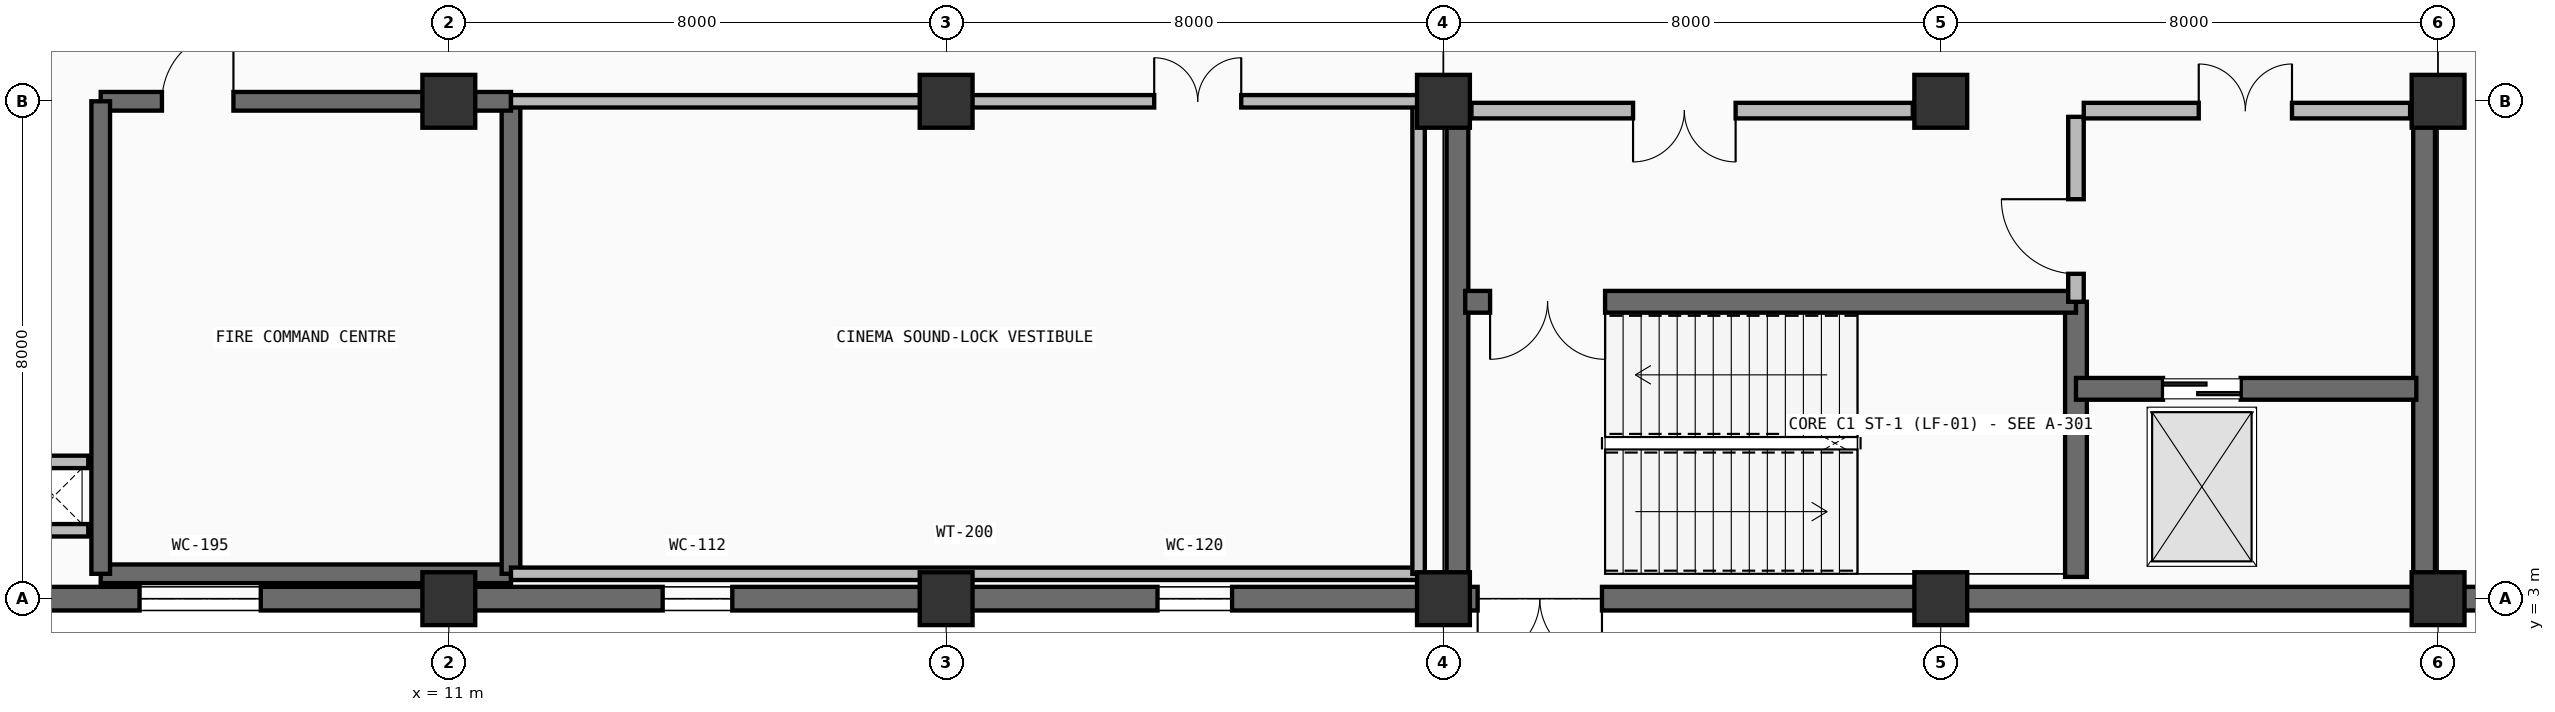
"""IFC4 building model, lengths in metres.
Left out: names, types, materials, properties, quantities, classifications, styles, units other than length and angle.
Written with IfcOpenShell. Run it as: python <this file> out.ifc"""

import sys

from ifc_helpers import new_model, si_unit, direction, frame, frame_2d, origin, origin_2d, place, context, subcontext, project, spatial, rectangle, extrude, element, fill, save


model = new_model("IFC4")
c1 = context("Model", 3, precision=1e-05, world=origin(), true_north=direction((0.0, 1.0)))
c2 = subcontext(c1, "Body", "Model", "MODEL_VIEW")
j1 = project(units=[si_unit("LENGTHUNIT", "METRE"), si_unit("PLANEANGLEUNIT", "RADIAN")], contexts=[c1])
p1 = place(None, origin())
s1 = spatial("IfcSite", under=j1, at=p1, CompositionType="ELEMENT")
p2 = place(p1, origin())
s2 = spatial("IfcBuilding", under=s1, at=p2, CompositionType="ELEMENT")
p3 = place(p2, origin())
s3 = spatial("IfcBuildingStorey", under=s2, at=p3, CompositionType="ELEMENT", Elevation=0.0)
for number, where, z_axis, x_axis in (
    (1, (11.0, 3.0, 0.0), (0.0, 0.0, 1.0), (1.0, 0.0, 0.0)),
    (2, (11.0, 11.0, 0.0), (0.0, 0.0, 1.0), (1.0, 0.0, 0.0)),
    (3, (19.0, 3.0, 0.0), (0.0, 0.0, 1.0), (1.0, 0.0, 0.0)),
    (4, (19.0, 11.0, 0.0), (0.0, 0.0, 1.0), (1.0, 0.0, 0.0)),
    (5, (27.0, 3.0, 0.0), (0.0, 0.0, 1.0), (1.0, 0.0, 0.0)),
    (6, (27.0, 11.0, 0.0), (0.0, 0.0, 1.0), (1.0, 0.0, 0.0)),
    (7, (35.0, 3.0, 0.0), (0.0, 0.0, 1.0), (1.0, 0.0, 0.0)),
    (8, (35.0, 11.0, 0.0), (0.0, 0.0, 1.0), (1.0, 0.0, 0.0)),
    (9, (43.0, 3.0, 0.0), (0.0, 0.0, 1.0), (1.0, 0.0, 0.0)),
    (10, (43.0, 11.0, 0.0), (0.0, 0.0, 1.0), (1.0, 0.0, 0.0)),
):
    element("IfcColumn", number, at=place(p3, frame(where, z_axis=z_axis, x_axis=x_axis)), inside=s3, PredefinedType="COLUMN", context=c2, shape_type="SweptSolid", body=[
        extrude(rectangle(XDim=0.85, YDim=0.85, at=origin_2d()), origin(), (0.0, 0.0, 1.0), 5.4),
    ])
p4 = place(p3, frame((51.0, 3.0, 0.0), z_axis=(0.0, 0.0, 1.0), x_axis=(-1.0, 0.0, 0.0)))
e11 = element("IfcWall", 11, at=p4, inside=s3, PredefinedType="SOLIDWALL", context=c2, shape_type="SweptSolid", body=[
    extrude(rectangle(XDim=8.0, YDim=0.38, at=frame_2d((4.0, 0.0))), origin(), (0.0, 0.0, 1.0), 5.4),
])
p5 = place(p4, frame((1.15, 0.0, 0.0)))
e12 = element("IfcOpeningElement", 12, at=p5, cuts=e11, PredefinedType="OPENING", context=c2, shape_type="SweptSolid", body=[
    extrude(rectangle(XDim=2.2, YDim=2.8, at=frame_2d((1.1, 1.4))), frame((0.0, 0.2, 0.0), z_axis=(0.0, -1.0, 0.0), x_axis=(1.0, 0.0, 0.0)), (0.0, 0.0, 1.0), 0.4),
])
p6 = place(p4, frame((4.65, 0.0, 0.0)))
e13 = element("IfcOpeningElement", 13, at=p6, cuts=e11, PredefinedType="OPENING", context=c2, shape_type="SweptSolid", body=[
    extrude(rectangle(XDim=2.2, YDim=2.8, at=frame_2d((1.1, 1.4))), frame((0.0, 0.2, 0.0), z_axis=(0.0, -1.0, 0.0), x_axis=(1.0, 0.0, 0.0)), (0.0, 0.0, 1.0), 0.4),
])
p7 = place(p3, frame((43.0, 3.0, 0.0), z_axis=(0.0, 0.0, 1.0), x_axis=(-1.0, 0.0, 0.0)))
e14 = element("IfcWall", 14, at=p7, inside=s3, PredefinedType="SOLIDWALL", context=c2, shape_type="SweptSolid", body=[
    extrude(rectangle(XDim=8.0, YDim=0.38, at=frame_2d((4.0, 0.0))), origin(), (0.0, 0.0, 1.0), 5.4),
])
p8 = place(p3, frame((35.0, 3.0, 0.0), z_axis=(0.0, 0.0, 1.0), x_axis=(-1.0, 0.0, 0.0)))
e15 = element("IfcWall", 15, at=p8, inside=s3, PredefinedType="SOLIDWALL", context=c2, shape_type="SweptSolid", body=[
    extrude(rectangle(XDim=8.0, YDim=0.38, at=frame_2d((4.0, 0.0))), origin(), (0.0, 0.0, 1.0), 5.4),
])
p9 = place(p8, frame((5.45, 0.0, 0.0)))
e16 = element("IfcOpeningElement", 16, at=p9, cuts=e15, PredefinedType="OPENING", context=c2, shape_type="SweptSolid", body=[
    extrude(rectangle(XDim=2.0, YDim=2.6, at=frame_2d((1.0, 1.3))), frame((0.0, 0.2, 0.0), z_axis=(0.0, -1.0, 0.0), x_axis=(1.0, 0.0, 0.0)), (0.0, 0.0, 1.0), 0.4),
])
p10 = place(p3, frame((27.0, 3.0, 0.0), z_axis=(0.0, 0.0, 1.0), x_axis=(-1.0, 0.0, 0.0)))
e17 = element("IfcWall", 17, at=p10, inside=s3, PredefinedType="SOLIDWALL", context=c2, shape_type="SweptSolid", body=[
    extrude(rectangle(XDim=8.0, YDim=0.38, at=frame_2d((4.0, 0.0))), origin(), (0.0, 0.0, 1.0), 5.4),
])
p11 = place(p10, frame((3.4, 0.0, 0.85)))
e18 = element("IfcOpeningElement", 18, at=p11, cuts=e17, PredefinedType="OPENING", context=c2, shape_type="SweptSolid", body=[
    extrude(rectangle(XDim=1.2, YDim=2.2, at=frame_2d((0.6, 1.1))), frame((0.0, 0.2, 0.0), z_axis=(0.0, -1.0, 0.0), x_axis=(1.0, 0.0, 0.0)), (0.0, 0.0, 1.0), 0.4),
])
p12 = place(p3, frame((19.0, 3.0, 0.0), z_axis=(0.0, 0.0, 1.0), x_axis=(-1.0, 0.0, 0.0)))
e19 = element("IfcWall", 19, at=p12, inside=s3, PredefinedType="SOLIDWALL", context=c2, shape_type="SweptSolid", body=[
    extrude(rectangle(XDim=8.0, YDim=0.38, at=frame_2d((4.0, 0.0))), origin(), (0.0, 0.0, 1.0), 5.4),
])
p13 = place(p12, frame((3.44, 0.0, 0.85)))
e20 = element("IfcOpeningElement", 20, at=p13, cuts=e19, PredefinedType="OPENING", context=c2, shape_type="SweptSolid", body=[
    extrude(rectangle(XDim=1.12, YDim=2.05, at=frame_2d((0.56, 1.025))), frame((0.0, 0.2, 0.0), z_axis=(0.0, -1.0, 0.0), x_axis=(1.0, 0.0, 0.0)), (0.0, 0.0, 1.0), 0.4),
])
p14 = place(p3, frame((11.0, 3.0, 0.0), z_axis=(0.0, 0.0, 1.0), x_axis=(-1.0, 0.0, 0.0)))
e21 = element("IfcWall", 21, at=p14, inside=s3, PredefinedType="SOLIDWALL", context=c2, shape_type="SweptSolid", body=[
    extrude(rectangle(XDim=8.0, YDim=0.38, at=frame_2d((4.0, 0.0))), origin(), (0.0, 0.0, 1.0), 5.4),
])
p15 = place(p14, frame((3.025, 0.0, 0.85)))
e22 = element("IfcOpeningElement", 22, at=p15, cuts=e21, PredefinedType="OPENING", context=c2, shape_type="SweptSolid", body=[
    extrude(rectangle(XDim=1.95, YDim=3.3, at=frame_2d((0.975, 1.65))), frame((0.0, 0.2, 0.0), z_axis=(0.0, -1.0, 0.0), x_axis=(1.0, 0.0, 0.0)), (0.0, 0.0, 1.0), 0.4),
])
p16 = place(p3, frame((27.225, 3.2, 0.0), z_axis=(0.0, 0.0, 1.0), x_axis=(0.0, 1.0, 0.0)))
e23 = element("IfcWall", 23, at=p16, inside=s3, PredefinedType="SHEAR", context=c2, shape_type="SweptSolid", body=[
    extrude(rectangle(XDim=7.6, YDim=0.35, at=frame_2d((3.8, 0.0))), origin(), (0.0, 0.0, 1.0), 5.1),
])
p17 = place(p3, frame((37.175, 3.35, 0.0), z_axis=(0.0, 0.0, 1.0), x_axis=(0.0, 1.0, 0.0)))
e24 = element("IfcWall", 24, at=p17, inside=s3, PredefinedType="SHEAR", context=c2, shape_type="SweptSolid", body=[
    extrude(rectangle(XDim=4.425, YDim=0.35, at=frame_2d((2.212, 0.0))), origin(), (0.0, 0.0, 1.0), 5.1),
])
p18 = place(p3, frame((42.775, 3.2, 0.0), z_axis=(0.0, 0.0, 1.0), x_axis=(0.0, 1.0, 0.0)))
e25 = element("IfcWall", 25, at=p18, inside=s3, PredefinedType="SHEAR", context=c2, shape_type="SweptSolid", body=[
    extrude(rectangle(XDim=7.6, YDim=0.35, at=frame_2d((3.8, 0.0))), origin(), (0.0, 0.0, 1.0), 5.1),
])
p19 = place(p3, frame((27.35, 7.775, 0.0), z_axis=(0.0, 0.0, 1.0), x_axis=(1.0, 0.0, 0.0)))
e26 = element("IfcWall", 26, at=p19, inside=s3, PredefinedType="SHEAR", context=c2, shape_type="SweptSolid", body=[
    extrude(rectangle(XDim=9.825, YDim=0.35, at=frame_2d((4.913, 0.0))), origin(), (0.0, 0.0, 1.0), 5.1),
])
p20 = place(p19, frame((0.4, 0.0, 0.0)))
e27 = element("IfcOpeningElement", 27, at=p20, cuts=e26, PredefinedType="OPENING", context=c2, shape_type="SweptSolid", body=[
    extrude(rectangle(XDim=1.85, YDim=2.25, at=frame_2d((0.925, 1.125))), frame((0.0, 0.185, 0.0), z_axis=(0.0, -1.0, 0.0), x_axis=(1.0, 0.0, 0.0)), (0.0, 0.0, 1.0), 0.37),
])
p21 = place(p3, frame((37.175, 6.375, 0.0), z_axis=(0.0, 0.0, 1.0), x_axis=(1.0, 0.0, 0.0)))
e28 = element("IfcWall", 28, at=p21, inside=s3, PredefinedType="SHEAR", context=c2, shape_type="SweptSolid", body=[
    extrude(rectangle(XDim=5.475, YDim=0.35, at=frame_2d((2.737, 0.0))), origin(), (0.0, 0.0, 1.0), 5.1),
])
p22 = place(p21, frame((1.4, 0.0, 0.0)))
e29 = element("IfcOpeningElement", 29, at=p22, cuts=e28, PredefinedType="OPENING", context=c2, shape_type="SweptSolid", body=[
    extrude(rectangle(XDim=1.25, YDim=2.25, at=frame_2d((0.625, 1.125))), frame((0.0, 0.185, 0.0), z_axis=(0.0, -1.0, 0.0), x_axis=(1.0, 0.0, 0.0)), (0.0, 0.0, 1.0), 0.37),
])
p23 = place(p3, frame((37.175, 7.775, 0.0), z_axis=(0.0, 0.0, 1.0), x_axis=(0.0, 1.0, 0.0)))
e30 = element("IfcWall", 30, at=p23, inside=s3, PredefinedType="PARTITIONING", context=c2, shape_type="SweptSolid", body=[
    extrude(rectangle(XDim=2.975, YDim=0.25, at=frame_2d((1.488, 0.0))), origin(), (0.0, 0.0, 1.0), 5.1),
])
p24 = place(p23, frame((0.45, 0.0, 0.0)))
e31 = element("IfcOpeningElement", 31, at=p24, cuts=e30, PredefinedType="OPENING", context=c2, shape_type="SweptSolid", body=[
    extrude(rectangle(XDim=1.2, YDim=2.2, at=frame_2d((0.6, 1.1))), frame((0.0, 0.135, 0.0), z_axis=(0.0, -1.0, 0.0), x_axis=(1.0, 0.0, 0.0)), (0.0, 0.0, 1.0), 0.27),
])
p25 = place(p3, frame((27.45, 10.85, 0.0), z_axis=(0.0, 0.0, 1.0), x_axis=(1.0, 0.0, 0.0)))
e32 = element("IfcWall", 32, at=p25, inside=s3, PredefinedType="PARTITIONING", context=c2, shape_type="SweptSolid", body=[
    extrude(rectangle(XDim=7.1, YDim=0.25, at=frame_2d((3.55, 0.0))), origin(), (0.0, 0.0, 1.0), 4.335),
])
p26 = place(p25, frame((2.6, 0.0, 0.0)))
e33 = element("IfcOpeningElement", 33, at=p26, cuts=e32, PredefinedType="OPENING", context=c2, shape_type="SweptSolid", body=[
    extrude(rectangle(XDim=1.65, YDim=2.25, at=frame_2d((0.825, 1.125))), frame((0.0, 0.135, 0.0), z_axis=(0.0, -1.0, 0.0), x_axis=(1.0, 0.0, 0.0)), (0.0, 0.0, 1.0), 0.27),
])
p27 = place(p3, frame((37.3, 10.85, 0.0), z_axis=(0.0, 0.0, 1.0), x_axis=(1.0, 0.0, 0.0)))
e34 = element("IfcWall", 34, at=p27, inside=s3, PredefinedType="PARTITIONING", context=c2, shape_type="SweptSolid", body=[
    extrude(rectangle(XDim=5.25, YDim=0.25, at=frame_2d((2.625, 0.0))), origin(), (0.0, 0.0, 1.0), 4.335),
])
p28 = place(p27, frame((1.85, 0.0, 0.0)))
e35 = element("IfcOpeningElement", 35, at=p28, cuts=e34, PredefinedType="OPENING", context=c2, shape_type="SweptSolid", body=[
    extrude(rectangle(XDim=1.5, YDim=2.2, at=frame_2d((0.75, 1.1))), frame((0.0, 0.135, 0.0), z_axis=(0.0, -1.0, 0.0), x_axis=(1.0, 0.0, 0.0)), (0.0, 0.0, 1.0), 0.27),
])
p29 = place(p3, frame((5.4, 3.4, 0.0), z_axis=(0.0, 0.0, 1.0), x_axis=(1.0, 0.0, 0.0)))
e36 = element("IfcWall", 36, at=p29, inside=s3, PredefinedType="SHEAR", context=c2, shape_type="SweptSolid", body=[
    extrude(rectangle(XDim=6.6, YDim=0.3, at=frame_2d((3.3, 0.0))), origin(), (0.0, 0.0, 1.0), 5.1),
])
p30 = place(p3, frame((12.0, 3.4, 0.0), z_axis=(0.0, 0.0, 1.0), x_axis=(0.0, 1.0, 0.0)))
e37 = element("IfcWall", 37, at=p30, inside=s3, PredefinedType="SHEAR", context=c2, shape_type="SweptSolid", body=[
    extrude(rectangle(XDim=7.6, YDim=0.3, at=frame_2d((3.8, 0.0))), origin(), (0.0, 0.0, 1.0), 5.1),
])
p31 = place(p3, frame((5.4, 11.0, 0.0), z_axis=(0.0, 0.0, 1.0), x_axis=(1.0, 0.0, 0.0)))
e38 = element("IfcWall", 38, at=p31, inside=s3, PredefinedType="SHEAR", context=c2, shape_type="SweptSolid", body=[
    extrude(rectangle(XDim=6.6, YDim=0.3, at=frame_2d((3.3, 0.0))), origin(), (0.0, 0.0, 1.0), 5.1),
])
p32 = place(p31, frame((0.985, 0.0, 0.0)))
e39 = element("IfcOpeningElement", 39, at=p32, cuts=e38, PredefinedType="OPENING", context=c2, shape_type="SweptSolid", body=[
    extrude(rectangle(XDim=1.15, YDim=2.18, at=frame_2d((0.575, 1.09))), frame((0.0, 0.16, 0.0), z_axis=(0.0, -1.0, 0.0), x_axis=(1.0, 0.0, 0.0)), (0.0, 0.0, 1.0), 0.32),
])
p33 = place(p3, frame((5.4, 3.4, 0.0), z_axis=(0.0, 0.0, 1.0), x_axis=(0.0, 1.0, 0.0)))
e40 = element("IfcWall", 40, at=p33, inside=s3, PredefinedType="SHEAR", context=c2, shape_type="SweptSolid", body=[
    extrude(rectangle(XDim=7.6, YDim=0.3, at=frame_2d((3.8, 0.0))), origin(), (0.0, 0.0, 1.0), 5.1),
])
p34 = place(p3, frame((12.0, 3.4, 0.0), z_axis=(0.0, 0.0, 1.0), x_axis=(1.0, 0.0, 0.0)))
e41 = element("IfcWall", 41, at=p34, inside=s3, PredefinedType="PARTITIONING", context=c2, shape_type="SweptSolid", body=[
    extrude(rectangle(XDim=14.6, YDim=0.2, at=frame_2d((7.3, 0.0))), origin(), (0.0, 0.0, 1.0), 4.405),
])
p35 = place(p3, frame((26.6, 3.4, 0.0), z_axis=(0.0, 0.0, 1.0), x_axis=(0.0, 1.0, 0.0)))
e42 = element("IfcWall", 42, at=p35, inside=s3, PredefinedType="PARTITIONING", context=c2, shape_type="SweptSolid", body=[
    extrude(rectangle(XDim=7.6, YDim=0.2, at=frame_2d((3.8, 0.0))), origin(), (0.0, 0.0, 1.0), 4.385),
])
p36 = place(p3, frame((12.0, 11.0, 0.0), z_axis=(0.0, 0.0, 1.0), x_axis=(1.0, 0.0, 0.0)))
e43 = element("IfcWall", 43, at=p36, inside=s3, PredefinedType="PARTITIONING", context=c2, shape_type="SweptSolid", body=[
    extrude(rectangle(XDim=14.6, YDim=0.2, at=frame_2d((7.3, 0.0))), origin(), (0.0, 0.0, 1.0), 4.335),
])
p37 = place(p36, frame((10.347, 0.0, 0.0)))
e44 = element("IfcOpeningElement", 44, at=p37, cuts=e43, PredefinedType="OPENING", context=c2, shape_type="SweptSolid", body=[
    extrude(rectangle(XDim=1.4, YDim=2.22, at=frame_2d((0.7, 1.11))), frame((0.0, 0.11, 0.0), z_axis=(0.0, -1.0, 0.0), x_axis=(1.0, 0.0, 0.0)), (0.0, 0.0, 1.0), 0.22),
])
for number, where, z_axis, x_axis in (
    (45, (4.1, 4.1, 0.0), (0.0, 0.0, 1.0), (1.0, 0.0, 0.0)),
    (46, (4.1, 5.2, 0.0), (0.0, 0.0, 1.0), (1.0, 0.0, 0.0)),
):
    element("IfcWall", number, at=place(p3, frame(where, z_axis=z_axis, x_axis=x_axis)), inside=s3, PredefinedType="PARTITIONING", context=c2, shape_type="SweptSolid", body=[
        extrude(rectangle(XDim=1.1, YDim=0.2, at=frame_2d((0.55, 0.0))), origin(), (0.0, 0.0, 1.0), 5.1),
    ])
p38 = place(p9, origin())
e47 = element("IfcDoor", 47, at=p38, inside=s3, OperationType="DOUBLE_DOOR_SINGLE_SWING", PredefinedType="DOOR", context=c2, shape_type="SweptSolid", body=[
    extrude(rectangle(XDim=2.0, YDim=2.6, at=frame_2d((1.0, 1.3))), frame((0.0, 0.025, 0.0), z_axis=(0.0, -1.0, 0.0), x_axis=(1.0, 0.0, 0.0)), (0.0, 0.0, 1.0), 0.05),
])
fill(e16, e47)
p39 = place(p11, origin())
e48 = element("IfcWindow", 48, at=p39, inside=s3, PartitioningType="SINGLE_PANEL", PredefinedType="WINDOW", context=c2, shape_type="SweptSolid", body=[
    extrude(rectangle(XDim=1.2, YDim=2.2, at=frame_2d((0.6, 1.1))), frame((0.0, 0.03, 0.0), z_axis=(0.0, -1.0, 0.0), x_axis=(1.0, 0.0, 0.0)), (0.0, 0.0, 1.0), 0.06),
])
fill(e18, e48)
p40 = place(p13, origin())
e49 = element("IfcWindow", 49, at=p40, inside=s3, PartitioningType="SINGLE_PANEL", PredefinedType="WINDOW", context=c2, shape_type="SweptSolid", body=[
    extrude(rectangle(XDim=1.12, YDim=2.05, at=frame_2d((0.56, 1.025))), frame((0.0, 0.03, 0.0), z_axis=(0.0, -1.0, 0.0), x_axis=(1.0, 0.0, 0.0)), (0.0, 0.0, 1.0), 0.06),
])
fill(e20, e49)
p41 = place(p15, origin())
e50 = element("IfcWindow", 50, at=p41, inside=s3, PartitioningType="SINGLE_PANEL", PredefinedType="WINDOW", context=c2, shape_type="SweptSolid", body=[
    extrude(rectangle(XDim=1.95, YDim=3.3, at=frame_2d((0.975, 1.65))), frame((0.0, 0.03, 0.0), z_axis=(0.0, -1.0, 0.0), x_axis=(1.0, 0.0, 0.0)), (0.0, 0.0, 1.0), 0.06),
])
fill(e22, e50)
p42 = place(p20, frame((1.85, 0.0, 0.0), z_axis=(0.0, 0.0, 1.0), x_axis=(-1.0, 0.0, 0.0)))
e51 = element("IfcDoor", 51, at=p42, inside=s3, OperationType="DOUBLE_DOOR_SINGLE_SWING", PredefinedType="DOOR", context=c2, shape_type="SweptSolid", body=[
    extrude(rectangle(XDim=1.85, YDim=2.25, at=frame_2d((0.925, 1.125))), frame((0.0, 0.025, 0.0), z_axis=(0.0, -1.0, 0.0), x_axis=(1.0, 0.0, 0.0)), (0.0, 0.0, 1.0), 0.05),
])
fill(e27, e51)
p43 = place(p22, origin())
e52 = element("IfcDoor", 52, at=p43, inside=s3, OperationType="DOUBLE_DOOR_SLIDING", PredefinedType="DOOR", context=c2, shape_type="SweptSolid", body=[
    extrude(rectangle(XDim=1.25, YDim=2.25, at=frame_2d((0.625, 1.125))), frame((0.0, 0.025, 0.0), z_axis=(0.0, -1.0, 0.0), x_axis=(1.0, 0.0, 0.0)), (0.0, 0.0, 1.0), 0.05),
])
fill(e29, e52)
p44 = place(p24, origin())
e53 = element("IfcDoor", 53, at=p44, inside=s3, OperationType="SINGLE_SWING_RIGHT", PredefinedType="DOOR", context=c2, shape_type="SweptSolid", body=[
    extrude(rectangle(XDim=1.2, YDim=2.2, at=frame_2d((0.6, 1.1))), frame((0.0, 0.025, 0.0), z_axis=(0.0, -1.0, 0.0), x_axis=(1.0, 0.0, 0.0)), (0.0, 0.0, 1.0), 0.05),
])
fill(e31, e53)
p45 = place(p26, frame((1.65, 0.0, 0.0), z_axis=(0.0, 0.0, 1.0), x_axis=(-1.0, 0.0, 0.0)))
e54 = element("IfcDoor", 54, at=p45, inside=s3, OperationType="DOUBLE_DOOR_SINGLE_SWING", PredefinedType="DOOR", context=c2, shape_type="SweptSolid", body=[
    extrude(rectangle(XDim=1.65, YDim=2.25, at=frame_2d((0.825, 1.125))), frame((0.0, 0.025, 0.0), z_axis=(0.0, -1.0, 0.0), x_axis=(1.0, 0.0, 0.0)), (0.0, 0.0, 1.0), 0.05),
])
fill(e33, e54)
p46 = place(p28, origin())
e55 = element("IfcDoor", 55, at=p46, inside=s3, OperationType="DOUBLE_DOOR_SINGLE_SWING", PredefinedType="DOOR", context=c2, shape_type="SweptSolid", body=[
    extrude(rectangle(XDim=1.5, YDim=2.2, at=frame_2d((0.75, 1.1))), frame((0.0, 0.025, 0.0), z_axis=(0.0, -1.0, 0.0), x_axis=(1.0, 0.0, 0.0)), (0.0, 0.0, 1.0), 0.05),
])
fill(e35, e55)
p47 = place(p32, origin())
e56 = element("IfcDoor", 56, at=p47, inside=s3, OperationType="SINGLE_SWING_RIGHT", PredefinedType="DOOR", context=c2, shape_type="SweptSolid", body=[
    extrude(rectangle(XDim=1.15, YDim=2.18, at=frame_2d((0.575, 1.09))), frame((0.0, 0.025, 0.0), z_axis=(0.0, -1.0, 0.0), x_axis=(1.0, 0.0, 0.0)), (0.0, 0.0, 1.0), 0.05),
])
fill(e39, e56)
p48 = place(p37, origin())
e57 = element("IfcDoor", 57, at=p48, inside=s3, OperationType="DOUBLE_DOOR_SINGLE_SWING", PredefinedType="DOOR", context=c2, shape_type="SweptSolid", body=[
    extrude(rectangle(XDim=1.4, YDim=2.22, at=frame_2d((0.7, 1.11))), frame((0.0, 0.025, 0.0), z_axis=(0.0, -1.0, 0.0), x_axis=(1.0, 0.0, 0.0)), (0.0, 0.0, 1.0), 0.05),
])
fill(e44, e57)
save(model, sys.argv[1])
